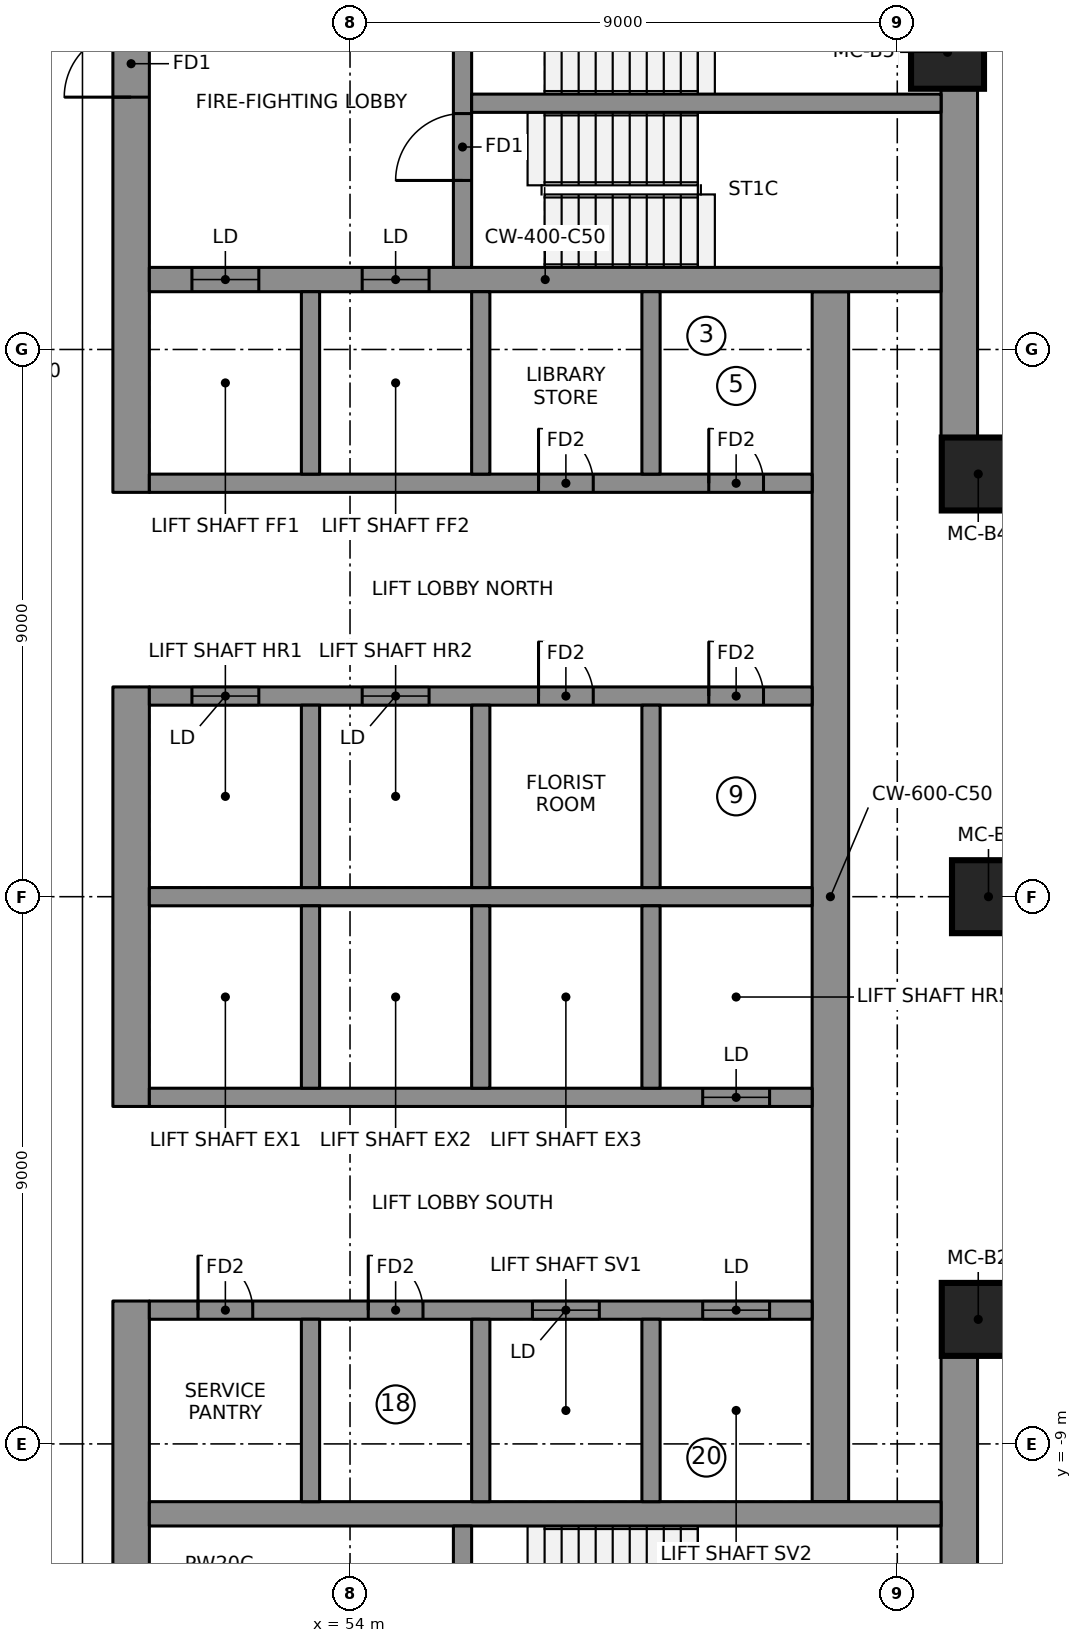
"""IFC4 building model, lengths in metres.
Left out: names, types, materials, properties, quantities, classifications, styles, units other than length and angle.
Written with IfcOpenShell. Run it as: python <this file> out.ifc"""

import sys

from ifc_helpers import new_model, si_unit, direction, frame, frame_2d, origin, origin_2d, place, context, subcontext, project, spatial, rectangle, extrude, element, fill, save


model = new_model("IFC4")
c1 = context("Model", 3, precision=1e-05, world=origin(), true_north=direction((0.0, 1.0)))
c2 = subcontext(c1, "Body", "Model", "MODEL_VIEW")
j1 = project(units=[si_unit("LENGTHUNIT", "METRE"), si_unit("PLANEANGLEUNIT", "RADIAN")], contexts=[c1])
p1 = place(None, origin())
s1 = spatial("IfcSite", under=j1, at=p1, CompositionType="ELEMENT")
p2 = place(p1, origin())
s2 = spatial("IfcBuilding", under=s1, at=p2, CompositionType="ELEMENT")
p3 = place(p2, frame((0.0, 0.0, 249.2)))
s3 = spatial("IfcBuildingStorey", under=s2, at=p3, CompositionType="ELEMENT", Elevation=249.2)
p4 = place(p3, frame((50.4, 6.65, 0.0), z_axis=(0.0, 0.0, 1.0), x_axis=(0.0, 1.0, 0.0)))
e1 = element("IfcWall", 1, at=p4, inside=s3, PredefinedType="SHEAR", context=c2, shape_type="SweptSolid", body=[
    extrude(rectangle(XDim=9.7, YDim=0.6, at=frame_2d((4.85, 0.0))), origin(), (0.0, 0.0, 1.0), 3.55),
])
p5 = place(p4, frame((6.5, 0.0, 0.0)))
e2 = element("IfcOpeningElement", 2, at=p5, cuts=e1, PredefinedType="OPENING", context=c2, shape_type="SweptSolid", body=[
    extrude(rectangle(XDim=1.1, YDim=2.1, at=frame_2d((0.55, 1.05))), frame((0.0, 0.31, 0.0), z_axis=(0.0, -1.0, 0.0), x_axis=(1.0, 0.0, 0.0)), (0.0, 0.0, 1.0), 0.62),
])
p6 = place(p3, frame((50.4, -3.45, 0.0), z_axis=(0.0, 0.0, 1.0), x_axis=(0.0, 1.0, 0.0)))
e3 = element("IfcWall", 3, at=p6, inside=s3, PredefinedType="SHEAR", context=c2, shape_type="SweptSolid", body=[
    extrude(rectangle(XDim=6.9, YDim=0.6, at=frame_2d((3.45, 0.0))), origin(), (0.0, 0.0, 1.0), 3.55),
])
p7 = place(p3, frame((50.4, -16.35, 0.0), z_axis=(0.0, 0.0, 1.0), x_axis=(0.0, 1.0, 0.0)))
e4 = element("IfcWall", 4, at=p7, inside=s3, PredefinedType="SHEAR", context=c2, shape_type="SweptSolid", body=[
    extrude(rectangle(XDim=9.7, YDim=0.6, at=frame_2d((4.85, 0.0))), origin(), (0.0, 0.0, 1.0), 3.55),
])
p8 = place(p7, frame((2.1, 0.0, 0.0)))
e5 = element("IfcOpeningElement", 5, at=p8, cuts=e4, PredefinedType="OPENING", context=c2, shape_type="SweptSolid", body=[
    extrude(rectangle(XDim=1.1, YDim=2.1, at=frame_2d((0.55, 1.05))), frame((0.0, 0.31, 0.0), z_axis=(0.0, -1.0, 0.0), x_axis=(1.0, 0.0, 0.0)), (0.0, 0.0, 1.0), 0.62),
])
for number, where, z_axis, x_axis in (
    (6, (64.02, 7.502, 0.0), (0.0, 0.0, 1.0), (0.0, 1.0, 0.0)),
    (7, (64.02, -15.75, 0.0), (0.0, 0.0, 1.0), (0.0, 1.0, 0.0)),
):
    element("IfcWall", number, at=place(p3, frame(where, z_axis=z_axis, x_axis=x_axis)), inside=s3, PredefinedType="SHEAR", context=c2, shape_type="SweptSolid", body=[
        extrude(rectangle(XDim=8.248, YDim=0.6, at=frame_2d((4.124, 0.0))), origin(), (0.0, 0.0, 1.0), 3.55),
    ])
p9 = place(p3, frame((61.9, -9.95, 0.0), z_axis=(0.0, 0.0, 1.0), x_axis=(0.0, 1.0, 0.0)))
e8 = element("IfcWall", 8, at=p9, inside=s3, PredefinedType="SHEAR", context=c2, shape_type="SweptSolid", body=[
    extrude(rectangle(XDim=19.9, YDim=0.6, at=frame_2d((9.95, 0.0))), origin(), (0.0, 0.0, 1.0), 3.55),
])
p10 = place(p3, frame((50.7, 10.15, 0.0), z_axis=(0.0, 0.0, 1.0), x_axis=(1.0, 0.0, 0.0)))
e9 = element("IfcWall", 9, at=p10, inside=s3, PredefinedType="SHEAR", context=c2, shape_type="SweptSolid", body=[
    extrude(rectangle(XDim=13.02, YDim=0.4, at=frame_2d((6.51, 0.0))), origin(), (0.0, 0.0, 1.0), 3.55),
])
p11 = place(p10, frame((0.7, 0.0, 0.0)))
e10 = element("IfcOpeningElement", 10, at=p11, cuts=e9, PredefinedType="OPENING", context=c2, shape_type="SweptSolid", body=[
    extrude(rectangle(XDim=1.1, YDim=2.1, at=frame_2d((0.55, 1.05))), frame((0.0, 0.21, 0.0), z_axis=(0.0, -1.0, 0.0), x_axis=(1.0, 0.0, 0.0)), (0.0, 0.0, 1.0), 0.42),
])
p12 = place(p10, frame((3.5, 0.0, 0.0)))
e11 = element("IfcOpeningElement", 11, at=p12, cuts=e9, PredefinedType="OPENING", context=c2, shape_type="SweptSolid", body=[
    extrude(rectangle(XDim=1.1, YDim=2.1, at=frame_2d((0.55, 1.05))), frame((0.0, 0.21, 0.0), z_axis=(0.0, -1.0, 0.0), x_axis=(1.0, 0.0, 0.0)), (0.0, 0.0, 1.0), 0.42),
])
p13 = place(p3, frame((50.7, -10.15, 0.0), z_axis=(0.0, 0.0, 1.0), x_axis=(1.0, 0.0, 0.0)))
e12 = element("IfcWall", 12, at=p13, inside=s3, PredefinedType="SHEAR", context=c2, shape_type="SweptSolid", body=[
    extrude(rectangle(XDim=13.02, YDim=0.4, at=frame_2d((6.51, 0.0))), origin(), (0.0, 0.0, 1.0), 3.55),
])
p14 = place(p3, frame((50.7, 0.0, 0.0), z_axis=(0.0, 0.0, 1.0), x_axis=(1.0, 0.0, 0.0)))
e13 = element("IfcWall", 13, at=p14, inside=s3, PredefinedType="SHEAR", context=c2, shape_type="SweptSolid", body=[
    extrude(rectangle(XDim=10.9, YDim=0.3, at=frame_2d((5.45, 0.0))), origin(), (0.0, 0.0, 1.0), 3.55),
])
p15 = place(p3, frame((50.7, 3.3, 0.0), z_axis=(0.0, 0.0, 1.0), x_axis=(1.0, 0.0, 0.0)))
e14 = element("IfcWall", 14, at=p15, inside=s3, PredefinedType="SHEAR", context=c2, shape_type="SweptSolid", body=[
    extrude(rectangle(XDim=10.9, YDim=0.3, at=frame_2d((5.45, 0.0))), origin(), (0.0, 0.0, 1.0), 3.55),
])
p16 = place(p15, frame((0.7, 0.0, 0.0)))
e15 = element("IfcOpeningElement", 15, at=p16, cuts=e14, PredefinedType="OPENING", context=c2, shape_type="SweptSolid", body=[
    extrude(rectangle(XDim=1.1, YDim=2.1, at=frame_2d((0.55, 1.05))), frame((0.0, 0.16, 0.0), z_axis=(0.0, -1.0, 0.0), x_axis=(1.0, 0.0, 0.0)), (0.0, 0.0, 1.0), 0.32),
])
p17 = place(p15, frame((3.5, 0.0, 0.0)))
e16 = element("IfcOpeningElement", 16, at=p17, cuts=e14, PredefinedType="OPENING", context=c2, shape_type="SweptSolid", body=[
    extrude(rectangle(XDim=1.1, YDim=2.1, at=frame_2d((0.55, 1.05))), frame((0.0, 0.16, 0.0), z_axis=(0.0, -1.0, 0.0), x_axis=(1.0, 0.0, 0.0)), (0.0, 0.0, 1.0), 0.32),
])
p18 = place(p15, frame((6.4, 0.0, 0.0)))
e17 = element("IfcOpeningElement", 17, at=p18, cuts=e14, PredefinedType="OPENING", context=c2, shape_type="SweptSolid", body=[
    extrude(rectangle(XDim=0.9, YDim=2.1, at=frame_2d((0.45, 1.05))), frame((0.0, 0.16, 0.0), z_axis=(0.0, -1.0, 0.0), x_axis=(1.0, 0.0, 0.0)), (0.0, 0.0, 1.0), 0.32),
])
p19 = place(p15, frame((9.2, 0.0, 0.0)))
e18 = element("IfcOpeningElement", 18, at=p19, cuts=e14, PredefinedType="OPENING", context=c2, shape_type="SweptSolid", body=[
    extrude(rectangle(XDim=0.9, YDim=2.1, at=frame_2d((0.45, 1.05))), frame((0.0, 0.16, 0.0), z_axis=(0.0, -1.0, 0.0), x_axis=(1.0, 0.0, 0.0)), (0.0, 0.0, 1.0), 0.32),
])
p20 = place(p3, frame((50.7, 6.8, 0.0), z_axis=(0.0, 0.0, 1.0), x_axis=(1.0, 0.0, 0.0)))
e19 = element("IfcWall", 19, at=p20, inside=s3, PredefinedType="SHEAR", context=c2, shape_type="SweptSolid", body=[
    extrude(rectangle(XDim=10.9, YDim=0.3, at=frame_2d((5.45, 0.0))), origin(), (0.0, 0.0, 1.0), 3.55),
])
p21 = place(p20, frame((6.4, 0.0, 0.0)))
e20 = element("IfcOpeningElement", 20, at=p21, cuts=e19, PredefinedType="OPENING", context=c2, shape_type="SweptSolid", body=[
    extrude(rectangle(XDim=0.9, YDim=2.1, at=frame_2d((0.45, 1.05))), frame((0.0, 0.16, 0.0), z_axis=(0.0, -1.0, 0.0), x_axis=(1.0, 0.0, 0.0)), (0.0, 0.0, 1.0), 0.32),
])
p22 = place(p20, frame((9.2, 0.0, 0.0)))
e21 = element("IfcOpeningElement", 21, at=p22, cuts=e19, PredefinedType="OPENING", context=c2, shape_type="SweptSolid", body=[
    extrude(rectangle(XDim=0.9, YDim=2.1, at=frame_2d((0.45, 1.05))), frame((0.0, 0.16, 0.0), z_axis=(0.0, -1.0, 0.0), x_axis=(1.0, 0.0, 0.0)), (0.0, 0.0, 1.0), 0.32),
])
for number, where, z_axis, x_axis in (
    (22, (53.35, 0.15, 0.0), (0.0, 0.0, 1.0), (0.0, 1.0, 0.0)),
    (23, (53.35, 6.95, 0.0), (0.0, 0.0, 1.0), (0.0, 1.0, 0.0)),
    (24, (56.15, 0.15, 0.0), (0.0, 0.0, 1.0), (0.0, 1.0, 0.0)),
    (25, (56.15, 6.95, 0.0), (0.0, 0.0, 1.0), (0.0, 1.0, 0.0)),
    (26, (58.95, 0.15, 0.0), (0.0, 0.0, 1.0), (0.0, 1.0, 0.0)),
    (27, (58.95, 6.95, 0.0), (0.0, 0.0, 1.0), (0.0, 1.0, 0.0)),
):
    element("IfcWall", number, at=place(p3, frame(where, z_axis=z_axis, x_axis=x_axis)), inside=s3, PredefinedType="SHEAR", context=c2, shape_type="SweptSolid", body=[
        extrude(rectangle(XDim=3.0, YDim=0.3, at=frame_2d((1.5, 0.0))), origin(), (0.0, 0.0, 1.0), 3.55),
    ])
p23 = place(p3, frame((50.7, -3.3, 0.0), z_axis=(0.0, 0.0, 1.0), x_axis=(1.0, 0.0, 0.0)))
e28 = element("IfcWall", 28, at=p23, inside=s3, PredefinedType="SHEAR", context=c2, shape_type="SweptSolid", body=[
    extrude(rectangle(XDim=10.9, YDim=0.3, at=frame_2d((5.45, 0.0))), origin(), (0.0, 0.0, 1.0), 3.55),
])
p24 = place(p23, frame((9.1, 0.0, 0.0)))
e29 = element("IfcOpeningElement", 29, at=p24, cuts=e28, PredefinedType="OPENING", context=c2, shape_type="SweptSolid", body=[
    extrude(rectangle(XDim=1.1, YDim=2.1, at=frame_2d((0.55, 1.05))), frame((0.0, 0.16, 0.0), z_axis=(0.0, -1.0, 0.0), x_axis=(1.0, 0.0, 0.0)), (0.0, 0.0, 1.0), 0.32),
])
p25 = place(p3, frame((50.7, -6.8, 0.0), z_axis=(0.0, 0.0, 1.0), x_axis=(1.0, 0.0, 0.0)))
e30 = element("IfcWall", 30, at=p25, inside=s3, PredefinedType="SHEAR", context=c2, shape_type="SweptSolid", body=[
    extrude(rectangle(XDim=10.9, YDim=0.3, at=frame_2d((5.45, 0.0))), origin(), (0.0, 0.0, 1.0), 3.55),
])
p26 = place(p25, frame((6.3, 0.0, 0.0)))
e31 = element("IfcOpeningElement", 31, at=p26, cuts=e30, PredefinedType="OPENING", context=c2, shape_type="SweptSolid", body=[
    extrude(rectangle(XDim=1.1, YDim=2.1, at=frame_2d((0.55, 1.05))), frame((0.0, 0.16, 0.0), z_axis=(0.0, -1.0, 0.0), x_axis=(1.0, 0.0, 0.0)), (0.0, 0.0, 1.0), 0.32),
])
p27 = place(p25, frame((9.1, 0.0, 0.0)))
e32 = element("IfcOpeningElement", 32, at=p27, cuts=e30, PredefinedType="OPENING", context=c2, shape_type="SweptSolid", body=[
    extrude(rectangle(XDim=1.1, YDim=2.1, at=frame_2d((0.55, 1.05))), frame((0.0, 0.16, 0.0), z_axis=(0.0, -1.0, 0.0), x_axis=(1.0, 0.0, 0.0)), (0.0, 0.0, 1.0), 0.32),
])
p28 = place(p25, frame((0.8, 0.0, 0.0)))
e33 = element("IfcOpeningElement", 33, at=p28, cuts=e30, PredefinedType="OPENING", context=c2, shape_type="SweptSolid", body=[
    extrude(rectangle(XDim=0.9, YDim=2.1, at=frame_2d((0.45, 1.05))), frame((0.0, 0.16, 0.0), z_axis=(0.0, -1.0, 0.0), x_axis=(1.0, 0.0, 0.0)), (0.0, 0.0, 1.0), 0.32),
])
p29 = place(p25, frame((3.6, 0.0, 0.0)))
e34 = element("IfcOpeningElement", 34, at=p29, cuts=e30, PredefinedType="OPENING", context=c2, shape_type="SweptSolid", body=[
    extrude(rectangle(XDim=0.9, YDim=2.1, at=frame_2d((0.45, 1.05))), frame((0.0, 0.16, 0.0), z_axis=(0.0, -1.0, 0.0), x_axis=(1.0, 0.0, 0.0)), (0.0, 0.0, 1.0), 0.32),
])
for number, where, z_axis, x_axis in (
    (35, (53.35, -3.15, 0.0), (0.0, 0.0, 1.0), (0.0, 1.0, 0.0)),
    (36, (53.35, -9.95, 0.0), (0.0, 0.0, 1.0), (0.0, 1.0, 0.0)),
    (37, (56.15, -3.15, 0.0), (0.0, 0.0, 1.0), (0.0, 1.0, 0.0)),
    (38, (56.15, -9.95, 0.0), (0.0, 0.0, 1.0), (0.0, 1.0, 0.0)),
    (39, (58.95, -3.15, 0.0), (0.0, 0.0, 1.0), (0.0, 1.0, 0.0)),
    (40, (58.95, -9.95, 0.0), (0.0, 0.0, 1.0), (0.0, 1.0, 0.0)),
):
    element("IfcWall", number, at=place(p3, frame(where, z_axis=z_axis, x_axis=x_axis)), inside=s3, PredefinedType="SHEAR", context=c2, shape_type="SweptSolid", body=[
        extrude(rectangle(XDim=3.0, YDim=0.3, at=frame_2d((1.5, 0.0))), origin(), (0.0, 0.0, 1.0), 3.55),
    ])
p30 = place(p3, frame((55.85, 10.35, 0.0), z_axis=(0.0, 0.0, 1.0), x_axis=(0.0, 1.0, 0.0)))
e41 = element("IfcWall", 41, at=p30, inside=s3, PredefinedType="SHEAR", context=c2, shape_type="SweptSolid", body=[
    extrude(rectangle(XDim=5.4, YDim=0.3, at=frame_2d((2.7, 0.0))), origin(), (0.0, 0.0, 1.0), 3.55),
])
p31 = place(p30, frame((1.43, 0.0, 0.0)))
e42 = element("IfcOpeningElement", 42, at=p31, cuts=e41, PredefinedType="OPENING", context=c2, shape_type="SweptSolid", body=[
    extrude(rectangle(XDim=1.1, YDim=2.1, at=frame_2d((0.55, 1.05))), frame((0.0, 0.16, 0.0), z_axis=(0.0, -1.0, 0.0), x_axis=(1.0, 0.0, 0.0)), (0.0, 0.0, 1.0), 0.32),
])
p32 = place(p30, frame((3.6, 0.0, 0.0)))
e43 = element("IfcOpeningElement", 43, at=p32, cuts=e41, PredefinedType="OPENING", context=c2, shape_type="SweptSolid", body=[
    extrude(rectangle(XDim=1.1, YDim=2.1, at=frame_2d((0.55, 1.05))), frame((0.0, 0.16, 0.0), z_axis=(0.0, -1.0, 0.0), x_axis=(1.0, 0.0, 0.0)), (0.0, 0.0, 1.0), 0.32),
])
p33 = place(p3, frame((55.85, -15.75, 0.0), z_axis=(0.0, 0.0, 1.0), x_axis=(0.0, 1.0, 0.0)))
e44 = element("IfcWall", 44, at=p33, inside=s3, PredefinedType="SHEAR", context=c2, shape_type="SweptSolid", body=[
    extrude(rectangle(XDim=5.4, YDim=0.3, at=frame_2d((2.7, 0.0))), origin(), (0.0, 0.0, 1.0), 3.55),
])
p34 = place(p33, frame((3.6, 0.0, 0.0)))
e45 = element("IfcOpeningElement", 45, at=p34, cuts=e44, PredefinedType="OPENING", context=c2, shape_type="SweptSolid", body=[
    extrude(rectangle(XDim=1.1, YDim=2.1, at=frame_2d((0.55, 1.05))), frame((0.0, 0.16, 0.0), z_axis=(0.0, -1.0, 0.0), x_axis=(1.0, 0.0, 0.0)), (0.0, 0.0, 1.0), 0.32),
])
p35 = place(p33, frame((0.8, 0.0, 0.0)))
e46 = element("IfcOpeningElement", 46, at=p35, cuts=e44, PredefinedType="OPENING", context=c2, shape_type="SweptSolid", body=[
    extrude(rectangle(XDim=0.9, YDim=2.1, at=frame_2d((0.45, 1.05))), frame((0.0, 0.16, 0.0), z_axis=(0.0, -1.0, 0.0), x_axis=(1.0, 0.0, 0.0)), (0.0, 0.0, 1.0), 0.32),
])
p36 = place(p3, frame((56.0, 13.05, 0.0), z_axis=(0.0, 0.0, 1.0), x_axis=(1.0, 0.0, 0.0)))
e47 = element("IfcWall", 47, at=p36, inside=s3, PredefinedType="SHEAR", context=c2, shape_type="SweptSolid", body=[
    extrude(rectangle(XDim=7.72, YDim=0.3, at=frame_2d((3.86, 0.0))), origin(), (0.0, 0.0, 1.0), 3.55),
])
for number, where, z_axis, x_axis in (
    (48, (64.332, -6.952, 0.0), (0.0, 0.0, 1.0), (1.0, 0.0, 0.0)),
    (49, (64.5, 0.0, 0.0), (0.0, 0.0, 1.0), (1.0, 0.0, 0.0)),
    (50, (64.332, 6.952, 0.0), (0.0, 0.0, 1.0), (1.0, 0.0, 0.0)),
    (51, (63.826, 13.888, 0.0), (0.0, 0.0, 1.0), (1.0, 0.0, 0.0)),
):
    element("IfcColumn", number, at=place(p3, frame(where, z_axis=z_axis, x_axis=x_axis)), inside=s3, PredefinedType="COLUMN", context=c2, shape_type="SweptSolid", body=[
        extrude(rectangle(XDim=1.2, YDim=1.2, at=origin_2d()), origin(), (0.0, 0.0, 1.0), 3.55),
    ])
p37 = place(p11, origin())
e52 = element("IfcDoor", 52, at=p37, inside=s3, OperationType="DOUBLE_DOOR_SLIDING", PredefinedType="DOOR", context=c2, shape_type="SweptSolid", body=[
    extrude(rectangle(XDim=1.1, YDim=2.1, at=frame_2d((0.55, 1.05))), frame((0.0, 0.025, 0.0), z_axis=(0.0, -1.0, 0.0), x_axis=(1.0, 0.0, 0.0)), (0.0, 0.0, 1.0), 0.05),
])
fill(e10, e52)
p38 = place(p12, origin())
e53 = element("IfcDoor", 53, at=p38, inside=s3, OperationType="DOUBLE_DOOR_SLIDING", PredefinedType="DOOR", context=c2, shape_type="SweptSolid", body=[
    extrude(rectangle(XDim=1.1, YDim=2.1, at=frame_2d((0.55, 1.05))), frame((0.0, 0.025, 0.0), z_axis=(0.0, -1.0, 0.0), x_axis=(1.0, 0.0, 0.0)), (0.0, 0.0, 1.0), 0.05),
])
fill(e11, e53)
p39 = place(p16, origin())
e54 = element("IfcDoor", 54, at=p39, inside=s3, OperationType="DOUBLE_DOOR_SLIDING", PredefinedType="DOOR", context=c2, shape_type="SweptSolid", body=[
    extrude(rectangle(XDim=1.1, YDim=2.1, at=frame_2d((0.55, 1.05))), frame((0.0, 0.025, 0.0), z_axis=(0.0, -1.0, 0.0), x_axis=(1.0, 0.0, 0.0)), (0.0, 0.0, 1.0), 0.05),
])
fill(e15, e54)
p40 = place(p17, origin())
e55 = element("IfcDoor", 55, at=p40, inside=s3, OperationType="DOUBLE_DOOR_SLIDING", PredefinedType="DOOR", context=c2, shape_type="SweptSolid", body=[
    extrude(rectangle(XDim=1.1, YDim=2.1, at=frame_2d((0.55, 1.05))), frame((0.0, 0.025, 0.0), z_axis=(0.0, -1.0, 0.0), x_axis=(1.0, 0.0, 0.0)), (0.0, 0.0, 1.0), 0.05),
])
fill(e16, e55)
p41 = place(p24, origin())
e56 = element("IfcDoor", 56, at=p41, inside=s3, OperationType="DOUBLE_DOOR_SLIDING", PredefinedType="DOOR", context=c2, shape_type="SweptSolid", body=[
    extrude(rectangle(XDim=1.1, YDim=2.1, at=frame_2d((0.55, 1.05))), frame((0.0, 0.025, 0.0), z_axis=(0.0, -1.0, 0.0), x_axis=(1.0, 0.0, 0.0)), (0.0, 0.0, 1.0), 0.05),
])
fill(e29, e56)
p42 = place(p26, origin())
e57 = element("IfcDoor", 57, at=p42, inside=s3, OperationType="DOUBLE_DOOR_SLIDING", PredefinedType="DOOR", context=c2, shape_type="SweptSolid", body=[
    extrude(rectangle(XDim=1.1, YDim=2.1, at=frame_2d((0.55, 1.05))), frame((0.0, 0.025, 0.0), z_axis=(0.0, -1.0, 0.0), x_axis=(1.0, 0.0, 0.0)), (0.0, 0.0, 1.0), 0.05),
])
fill(e31, e57)
p43 = place(p27, origin())
e58 = element("IfcDoor", 58, at=p43, inside=s3, OperationType="DOUBLE_DOOR_SLIDING", PredefinedType="DOOR", context=c2, shape_type="SweptSolid", body=[
    extrude(rectangle(XDim=1.1, YDim=2.1, at=frame_2d((0.55, 1.05))), frame((0.0, 0.025, 0.0), z_axis=(0.0, -1.0, 0.0), x_axis=(1.0, 0.0, 0.0)), (0.0, 0.0, 1.0), 0.05),
])
fill(e32, e58)
p44 = place(p31, origin())
e59 = element("IfcDoor", 59, at=p44, inside=s3, OperationType="SINGLE_SWING_RIGHT", PredefinedType="DOOR", context=c2, shape_type="SweptSolid", body=[
    extrude(rectangle(XDim=1.1, YDim=2.1, at=frame_2d((0.55, 1.05))), frame((0.0, 0.025, 0.0), z_axis=(0.0, -1.0, 0.0), x_axis=(1.0, 0.0, 0.0)), (0.0, 0.0, 1.0), 0.05),
])
fill(e42, e59)
p45 = place(p5, origin())
e60 = element("IfcDoor", 60, at=p45, inside=s3, OperationType="SINGLE_SWING_RIGHT", PredefinedType="DOOR", context=c2, shape_type="SweptSolid", body=[
    extrude(rectangle(XDim=1.1, YDim=2.1, at=frame_2d((0.55, 1.05))), frame((0.0, 0.025, 0.0), z_axis=(0.0, -1.0, 0.0), x_axis=(1.0, 0.0, 0.0)), (0.0, 0.0, 1.0), 0.05),
])
fill(e2, e60)
p46 = place(p21, origin())
e61 = element("IfcDoor", 61, at=p46, inside=s3, OperationType="SINGLE_SWING_LEFT", PredefinedType="DOOR", context=c2, shape_type="SweptSolid", body=[
    extrude(rectangle(XDim=0.9, YDim=2.1, at=frame_2d((0.45, 1.05))), frame((0.0, 0.025, 0.0), z_axis=(0.0, -1.0, 0.0), x_axis=(1.0, 0.0, 0.0)), (0.0, 0.0, 1.0), 0.05),
])
fill(e20, e61)
p47 = place(p22, origin())
e62 = element("IfcDoor", 62, at=p47, inside=s3, OperationType="SINGLE_SWING_LEFT", PredefinedType="DOOR", context=c2, shape_type="SweptSolid", body=[
    extrude(rectangle(XDim=0.9, YDim=2.1, at=frame_2d((0.45, 1.05))), frame((0.0, 0.025, 0.0), z_axis=(0.0, -1.0, 0.0), x_axis=(1.0, 0.0, 0.0)), (0.0, 0.0, 1.0), 0.05),
])
fill(e21, e62)
p48 = place(p18, origin())
e63 = element("IfcDoor", 63, at=p48, inside=s3, OperationType="SINGLE_SWING_LEFT", PredefinedType="DOOR", context=c2, shape_type="SweptSolid", body=[
    extrude(rectangle(XDim=0.9, YDim=2.1, at=frame_2d((0.45, 1.05))), frame((0.0, 0.025, 0.0), z_axis=(0.0, -1.0, 0.0), x_axis=(1.0, 0.0, 0.0)), (0.0, 0.0, 1.0), 0.05),
])
fill(e17, e63)
p49 = place(p19, origin())
e64 = element("IfcDoor", 64, at=p49, inside=s3, OperationType="SINGLE_SWING_LEFT", PredefinedType="DOOR", context=c2, shape_type="SweptSolid", body=[
    extrude(rectangle(XDim=0.9, YDim=2.1, at=frame_2d((0.45, 1.05))), frame((0.0, 0.025, 0.0), z_axis=(0.0, -1.0, 0.0), x_axis=(1.0, 0.0, 0.0)), (0.0, 0.0, 1.0), 0.05),
])
fill(e18, e64)
p50 = place(p28, origin())
e65 = element("IfcDoor", 65, at=p50, inside=s3, OperationType="SINGLE_SWING_LEFT", PredefinedType="DOOR", context=c2, shape_type="SweptSolid", body=[
    extrude(rectangle(XDim=0.9, YDim=2.1, at=frame_2d((0.45, 1.05))), frame((0.0, 0.025, 0.0), z_axis=(0.0, -1.0, 0.0), x_axis=(1.0, 0.0, 0.0)), (0.0, 0.0, 1.0), 0.05),
])
fill(e33, e65)
p51 = place(p29, origin())
e66 = element("IfcDoor", 66, at=p51, inside=s3, OperationType="SINGLE_SWING_LEFT", PredefinedType="DOOR", context=c2, shape_type="SweptSolid", body=[
    extrude(rectangle(XDim=0.9, YDim=2.1, at=frame_2d((0.45, 1.05))), frame((0.0, 0.025, 0.0), z_axis=(0.0, -1.0, 0.0), x_axis=(1.0, 0.0, 0.0)), (0.0, 0.0, 1.0), 0.05),
])
fill(e34, e66)
save(model, sys.argv[1])
